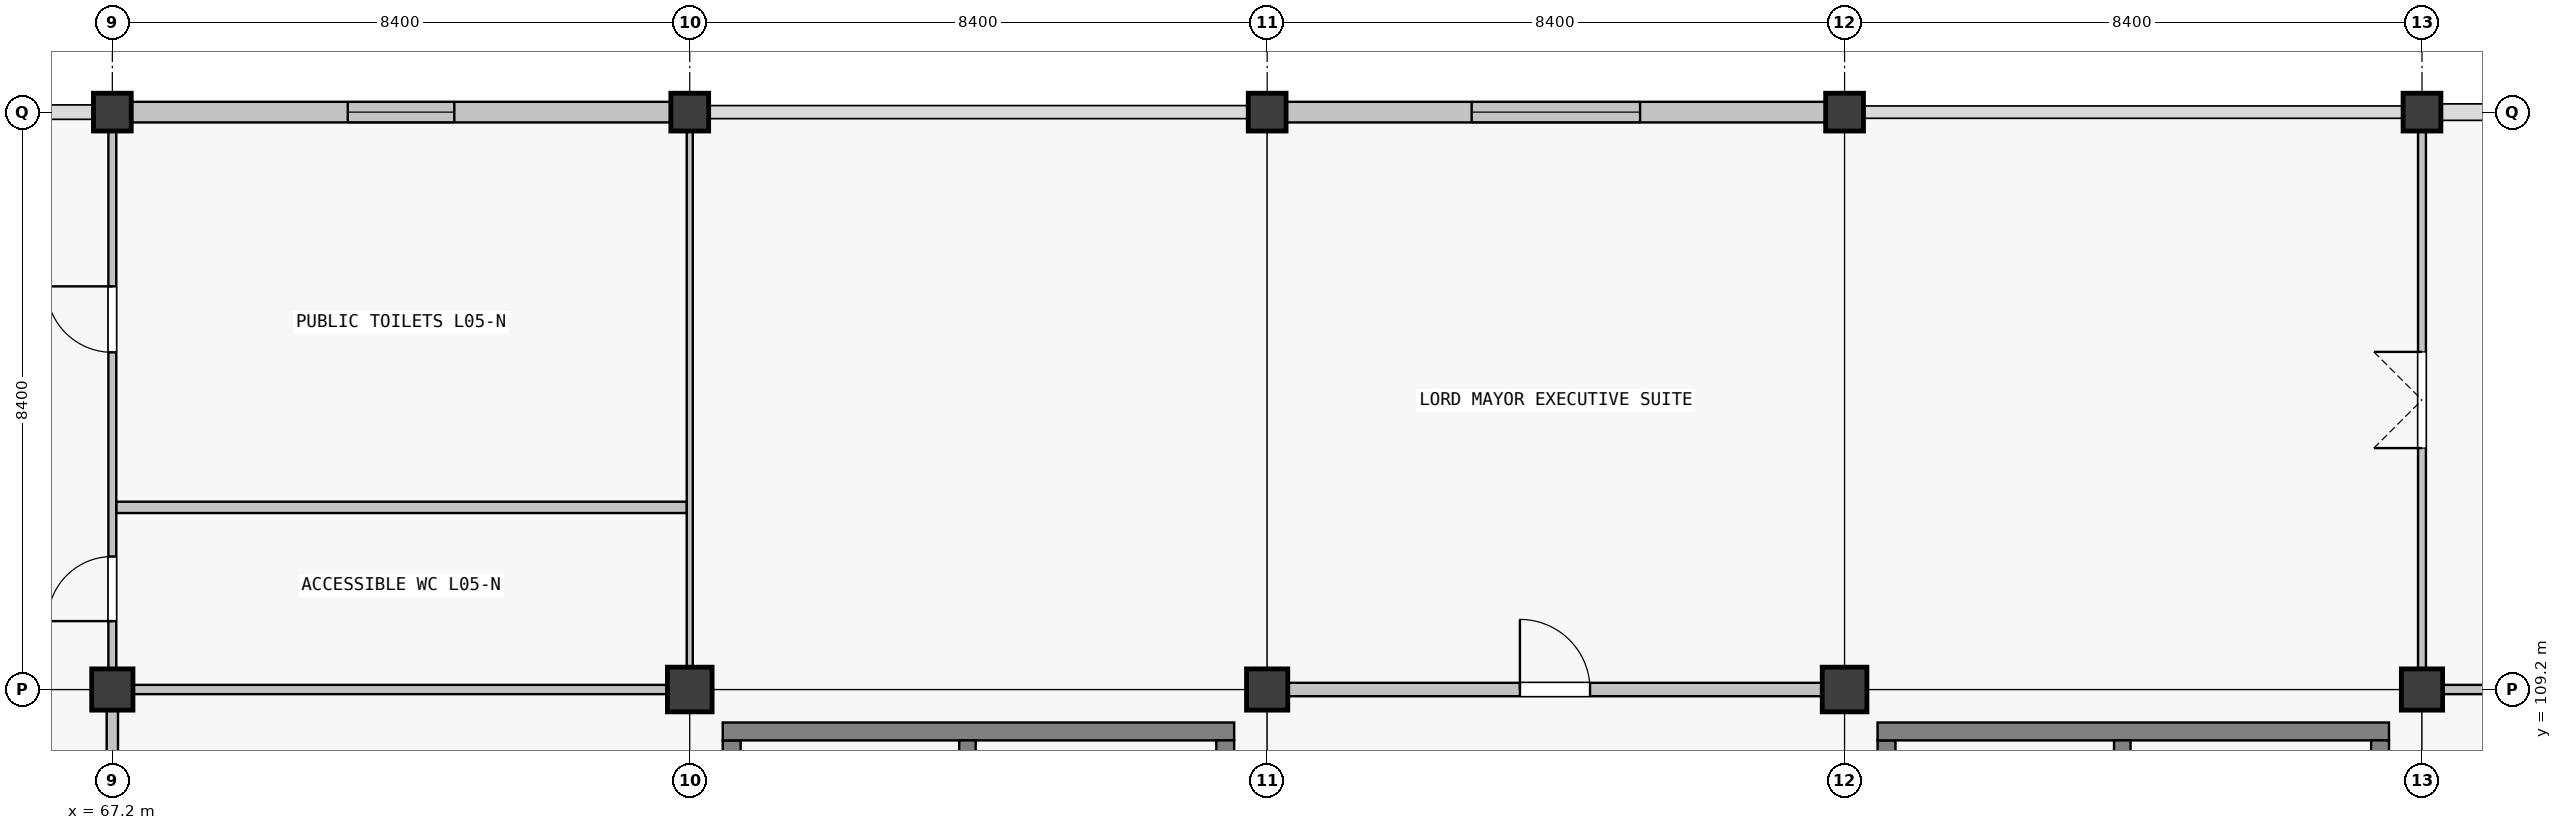
"""IFC4 building model, lengths in metres.
Left out: names, types, materials, properties, quantities, classifications, styles, units other than length and angle.
Written with IfcOpenShell. Run it as: python <this file> out.ifc"""

import sys

from ifc_helpers import new_model, si_unit, direction, frame, frame_2d, origin, origin_2d, place, context, subcontext, project, spatial, rectangle, extrude, element, fill, save


model = new_model("IFC4")
c1 = context("Model", 3, precision=1e-05, world=origin(), true_north=direction((0.0, 1.0)))
c2 = subcontext(c1, "Body", "Model", "MODEL_VIEW")
j1 = project(units=[si_unit("LENGTHUNIT", "METRE"), si_unit("PLANEANGLEUNIT", "RADIAN")], contexts=[c1])
p1 = place(None, origin())
s1 = spatial("IfcSite", under=j1, at=p1, CompositionType="ELEMENT")
p2 = place(p1, origin())
s2 = spatial("IfcBuilding", under=s1, at=p2, CompositionType="ELEMENT")
p3 = place(p2, frame((0.0, 0.0, 23.4)))
s3 = spatial("IfcBuildingStorey", under=s2, at=p3, CompositionType="ELEMENT", Elevation=23.4)
p4 = place(p3, frame((67.2, 109.2, 0.0), z_axis=(0.0, 0.0, 1.0), x_axis=(1.0, 0.0, 0.0)))
e1 = element("IfcColumn", 1, at=p4, inside=s3, PredefinedType="COLUMN", context=c2, shape_type="SweptSolid", body=[
    extrude(rectangle(XDim=0.6, YDim=0.6, at=origin_2d()), origin(), (0.0, 0.0, 1.0), 4.32),
])
p5 = place(p3, frame((67.2, 117.6, 0.0), z_axis=(0.0, 0.0, 1.0), x_axis=(1.0, 0.0, 0.0)))
e2 = element("IfcColumn", 2, at=p5, inside=s3, PredefinedType="COLUMN", context=c2, shape_type="SweptSolid", body=[
    extrude(rectangle(XDim=0.55, YDim=0.55, at=origin_2d()), origin(), (0.0, 0.0, 1.0), 4.07),
])
p6 = place(p3, frame((75.6, 109.2, 0.0), z_axis=(0.0, 0.0, 1.0), x_axis=(1.0, 0.0, 0.0)))
e3 = element("IfcColumn", 3, at=p6, inside=s3, PredefinedType="COLUMN", context=c2, shape_type="SweptSolid", body=[
    extrude(rectangle(XDim=0.65, YDim=0.65, at=origin_2d()), origin(), (0.0, 0.0, 1.0), 4.32),
])
p7 = place(p3, frame((75.6, 117.6, 0.0), z_axis=(0.0, 0.0, 1.0), x_axis=(1.0, 0.0, 0.0)))
e4 = element("IfcColumn", 4, at=p7, inside=s3, PredefinedType="COLUMN", context=c2, shape_type="SweptSolid", body=[
    extrude(rectangle(XDim=0.55, YDim=0.55, at=origin_2d()), origin(), (0.0, 0.0, 1.0), 4.07),
])
p8 = place(p3, frame((84.0, 109.2, 0.0), z_axis=(0.0, 0.0, 1.0), x_axis=(1.0, 0.0, 0.0)))
e5 = element("IfcColumn", 5, at=p8, inside=s3, PredefinedType="COLUMN", context=c2, shape_type="SweptSolid", body=[
    extrude(rectangle(XDim=0.6, YDim=0.6, at=origin_2d()), origin(), (0.0, 0.0, 1.0), 4.32),
])
p9 = place(p3, frame((84.0, 117.6, 0.0), z_axis=(0.0, 0.0, 1.0), x_axis=(1.0, 0.0, 0.0)))
e6 = element("IfcColumn", 6, at=p9, inside=s3, PredefinedType="COLUMN", context=c2, shape_type="SweptSolid", body=[
    extrude(rectangle(XDim=0.55, YDim=0.55, at=origin_2d()), origin(), (0.0, 0.0, 1.0), 4.07),
])
p10 = place(p3, frame((92.4, 109.2, 0.0), z_axis=(0.0, 0.0, 1.0), x_axis=(1.0, 0.0, 0.0)))
e7 = element("IfcColumn", 7, at=p10, inside=s3, PredefinedType="COLUMN", context=c2, shape_type="SweptSolid", body=[
    extrude(rectangle(XDim=0.65, YDim=0.65, at=origin_2d()), origin(), (0.0, 0.0, 1.0), 4.32),
])
p11 = place(p3, frame((92.4, 117.6, 0.0), z_axis=(0.0, 0.0, 1.0), x_axis=(1.0, 0.0, 0.0)))
e8 = element("IfcColumn", 8, at=p11, inside=s3, PredefinedType="COLUMN", context=c2, shape_type="SweptSolid", body=[
    extrude(rectangle(XDim=0.55, YDim=0.55, at=origin_2d()), origin(), (0.0, 0.0, 1.0), 4.07),
])
p12 = place(p3, frame((100.8, 109.2, 0.0), z_axis=(0.0, 0.0, 1.0), x_axis=(1.0, 0.0, 0.0)))
e9 = element("IfcColumn", 9, at=p12, inside=s3, PredefinedType="COLUMN", context=c2, shape_type="SweptSolid", body=[
    extrude(rectangle(XDim=0.6, YDim=0.6, at=origin_2d()), origin(), (0.0, 0.0, 1.0), 4.32),
])
p13 = place(p3, frame((100.8, 117.6, 0.0), z_axis=(0.0, 0.0, 1.0), x_axis=(1.0, 0.0, 0.0)))
e10 = element("IfcColumn", 10, at=p13, inside=s3, PredefinedType="COLUMN", context=c2, shape_type="SweptSolid", body=[
    extrude(rectangle(XDim=0.55, YDim=0.55, at=origin_2d()), origin(), (0.0, 0.0, 1.0), 4.07),
])
p14 = place(p3, frame((67.476, 117.6, 0.0), z_axis=(0.0, 0.0, 1.0), x_axis=(1.0, 0.0, 0.0)))
e11 = element("IfcWall", 11, at=p14, inside=s3, PredefinedType="SOLIDWALL", context=c2, shape_type="SweptSolid", body=[
    extrude(rectangle(XDim=7.848, YDim=0.3, at=frame_2d((3.924, 0.0))), origin(), (0.0, 0.0, 1.0), 3.37),
])
p15 = place(p14, frame((3.149, 0.0, 0.9)))
e12 = element("IfcOpeningElement", 12, at=p15, cuts=e11, PredefinedType="OPENING", context=c2, shape_type="SweptSolid", body=[
    extrude(rectangle(XDim=1.55, YDim=1.6, at=frame_2d((0.775, 0.8))), frame((0.0, 0.15, 0.0), z_axis=(0.0, -1.0, 0.0), x_axis=(1.0, 0.0, 0.0)), (0.0, 0.0, 1.0), 0.3),
])
p16 = place(p3, frame((84.276, 117.6, 0.0), z_axis=(0.0, 0.0, 1.0), x_axis=(1.0, 0.0, 0.0)))
e13 = element("IfcWall", 13, at=p16, inside=s3, PredefinedType="SOLIDWALL", context=c2, shape_type="SweptSolid", body=[
    extrude(rectangle(XDim=7.848, YDim=0.3, at=frame_2d((3.924, 0.0))), origin(), (0.0, 0.0, 1.0), 3.37),
])
p17 = place(p16, frame((2.699, 0.0, 0.9)))
e14 = element("IfcOpeningElement", 14, at=p17, cuts=e13, PredefinedType="OPENING", context=c2, shape_type="SweptSolid", body=[
    extrude(rectangle(XDim=2.45, YDim=1.45, at=frame_2d((1.225, 0.725))), frame((0.0, 0.15, 0.0), z_axis=(0.0, -1.0, 0.0), x_axis=(1.0, 0.0, 0.0)), (0.0, 0.0, 1.0), 0.3),
])
p18 = place(p3, frame((76.21, 101.54, 0.0), z_axis=(0.0, 0.0, 1.0), x_axis=(0.0, 1.0, 0.0)))
e15 = element("IfcWall", 15, at=p18, inside=s3, PredefinedType="SHEAR", context=c2, shape_type="SweptSolid", body=[
    extrude(rectangle(XDim=6.92, YDim=0.26, at=frame_2d((3.46, 0.0))), origin(), (0.0, 0.0, 1.0), 4.32),
])
p19 = place(p3, frame((76.08, 108.59, 0.0), z_axis=(0.0, 0.0, 1.0), x_axis=(1.0, 0.0, 0.0)))
e16 = element("IfcWall", 16, at=p19, inside=s3, PredefinedType="SHEAR", context=c2, shape_type="SweptSolid", body=[
    extrude(rectangle(XDim=7.44, YDim=0.26, at=frame_2d((3.72, 0.0))), origin(), (0.0, 0.0, 1.0), 4.32),
])
p20 = place(p3, frame((83.39, 108.46, 0.0), z_axis=(0.0, 0.0, 1.0), x_axis=(0.0, -1.0, 0.0)))
e17 = element("IfcWall", 17, at=p20, inside=s3, PredefinedType="SHEAR", context=c2, shape_type="SweptSolid", body=[
    extrude(rectangle(XDim=6.92, YDim=0.26, at=frame_2d((3.46, 0.0))), origin(), (0.0, 0.0, 1.0), 4.32),
])
p21 = place(p20, frame((4.01, 0.0, 0.0)))
e18 = element("IfcOpeningElement", 18, at=p21, cuts=e17, PredefinedType="OPENING", context=c2, shape_type="SweptSolid", body=[
    extrude(rectangle(XDim=1.5, YDim=2.15, at=frame_2d((0.75, 1.075))), frame((0.0, 0.13, 0.0), z_axis=(0.0, -1.0, 0.0), x_axis=(1.0, 0.0, 0.0)), (0.0, 0.0, 1.0), 0.26),
])
p22 = place(p3, frame((79.64, 101.54, 0.0), z_axis=(0.0, 0.0, 1.0), x_axis=(0.0, 1.0, 0.0)))
e19 = element("IfcWall", 19, at=p22, inside=s3, PredefinedType="SHEAR", context=c2, shape_type="SweptSolid", body=[
    extrude(rectangle(XDim=6.92, YDim=0.24, at=frame_2d((3.46, 0.0))), origin(), (0.0, 0.0, 1.0), 4.32),
])
p23 = place(p22, frame((0.12, 0.0, 0.0)))
e20 = element("IfcOpeningElement", 20, at=p23, cuts=e19, PredefinedType="OPENING", context=c2, shape_type="SweptSolid", body=[
    extrude(rectangle(XDim=1.0, YDim=2.15, at=frame_2d((0.5, 1.075))), frame((0.0, 0.12, 0.0), z_axis=(0.0, -1.0, 0.0), x_axis=(1.0, 0.0, 0.0)), (0.0, 0.0, 1.0), 0.24),
])
p24 = place(p3, frame((93.01, 101.54, 0.0), z_axis=(0.0, 0.0, 1.0), x_axis=(0.0, 1.0, 0.0)))
e21 = element("IfcWall", 21, at=p24, inside=s3, PredefinedType="SHEAR", context=c2, shape_type="SweptSolid", body=[
    extrude(rectangle(XDim=6.92, YDim=0.26, at=frame_2d((3.46, 0.0))), origin(), (0.0, 0.0, 1.0), 4.32),
])
p25 = place(p3, frame((92.88, 108.59, 0.0), z_axis=(0.0, 0.0, 1.0), x_axis=(1.0, 0.0, 0.0)))
e22 = element("IfcWall", 22, at=p25, inside=s3, PredefinedType="SHEAR", context=c2, shape_type="SweptSolid", body=[
    extrude(rectangle(XDim=7.44, YDim=0.26, at=frame_2d((3.72, 0.0))), origin(), (0.0, 0.0, 1.0), 4.32),
])
p26 = place(p3, frame((100.19, 108.46, 0.0), z_axis=(0.0, 0.0, 1.0), x_axis=(0.0, -1.0, 0.0)))
e23 = element("IfcWall", 23, at=p26, inside=s3, PredefinedType="SHEAR", context=c2, shape_type="SweptSolid", body=[
    extrude(rectangle(XDim=6.92, YDim=0.26, at=frame_2d((3.46, 0.0))), origin(), (0.0, 0.0, 1.0), 4.32),
])
p27 = place(p26, frame((4.01, 0.0, 0.0)))
e24 = element("IfcOpeningElement", 24, at=p27, cuts=e23, PredefinedType="OPENING", context=c2, shape_type="SweptSolid", body=[
    extrude(rectangle(XDim=1.5, YDim=2.15, at=frame_2d((0.75, 1.075))), frame((0.0, 0.13, 0.0), z_axis=(0.0, -1.0, 0.0), x_axis=(1.0, 0.0, 0.0)), (0.0, 0.0, 1.0), 0.26),
])
p28 = place(p3, frame((96.44, 101.54, 0.0), z_axis=(0.0, 0.0, 1.0), x_axis=(0.0, 1.0, 0.0)))
e25 = element("IfcWall", 25, at=p28, inside=s3, PredefinedType="SHEAR", context=c2, shape_type="SweptSolid", body=[
    extrude(rectangle(XDim=6.92, YDim=0.24, at=frame_2d((3.46, 0.0))), origin(), (0.0, 0.0, 1.0), 4.32),
])
p29 = place(p28, frame((0.12, 0.0, 0.0)))
e26 = element("IfcOpeningElement", 26, at=p29, cuts=e25, PredefinedType="OPENING", context=c2, shape_type="SweptSolid", body=[
    extrude(rectangle(XDim=1.0, YDim=2.15, at=frame_2d((0.5, 1.075))), frame((0.0, 0.12, 0.0), z_axis=(0.0, -1.0, 0.0), x_axis=(1.0, 0.0, 0.0)), (0.0, 0.0, 1.0), 0.24),
])
p30 = place(p3, frame((67.502, 109.2, 0.0), z_axis=(0.0, 0.0, 1.0), x_axis=(1.0, 0.0, 0.0)))
e27 = element("IfcWall", 27, at=p30, inside=s3, PredefinedType="PARTITIONING", context=c2, shape_type="SweptSolid", body=[
    extrude(rectangle(XDim=7.771, YDim=0.135, at=frame_2d((3.885, 0.0))), origin(), (0.0, 0.0, 1.0), 3.19),
])
p31 = place(p3, frame((84.302, 109.2, 0.0), z_axis=(0.0, 0.0, 1.0), x_axis=(1.0, 0.0, 0.0)))
e28 = element("IfcWall", 28, at=p31, inside=s3, PredefinedType="PARTITIONING", context=c2, shape_type="SweptSolid", body=[
    extrude(rectangle(XDim=7.771, YDim=0.195, at=frame_2d((3.885, 0.0))), origin(), (0.0, 0.0, 1.0), 3.19),
])
p32 = place(p31, frame((3.375, 0.0, 0.0)))
e29 = element("IfcOpeningElement", 29, at=p32, cuts=e28, PredefinedType="OPENING", context=c2, shape_type="SweptSolid", body=[
    extrude(rectangle(XDim=1.02, YDim=2.2, at=frame_2d((0.51, 1.1))), frame((0.0, 0.098, 0.0), z_axis=(0.0, -1.0, 0.0), x_axis=(1.0, 0.0, 0.0)), (0.0, 0.0, 1.0), 0.195),
])
p33 = place(p3, frame((101.102, 109.2, 0.0), z_axis=(0.0, 0.0, 1.0), x_axis=(1.0, 0.0, 0.0)))
e30 = element("IfcWall", 30, at=p33, inside=s3, PredefinedType="PARTITIONING", context=c2, shape_type="SweptSolid", body=[
    extrude(rectangle(XDim=7.771, YDim=0.135, at=frame_2d((3.885, 0.0))), origin(), (0.0, 0.0, 1.0), 3.19),
])
p34 = place(p33, frame((3.035, 0.0, 0.0)))
e31 = element("IfcOpeningElement", 31, at=p34, cuts=e30, PredefinedType="OPENING", context=c2, shape_type="SweptSolid", body=[
    extrude(rectangle(XDim=1.7, YDim=2.35, at=frame_2d((0.85, 1.175))), frame((0.0, 0.067, 0.0), z_axis=(0.0, -1.0, 0.0), x_axis=(1.0, 0.0, 0.0)), (0.0, 0.0, 1.0), 0.135),
])
p35 = place(p3, frame((67.2, 101.127, 0.0), z_axis=(0.0, 0.0, 1.0), x_axis=(0.0, 1.0, 0.0)))
e32 = element("IfcWall", 32, at=p35, inside=s3, PredefinedType="PARTITIONING", context=c2, shape_type="SweptSolid", body=[
    extrude(rectangle(XDim=7.771, YDim=0.165, at=frame_2d((3.885, 0.0))), origin(), (0.0, 0.0, 1.0), 3.19),
])
p36 = place(p35, frame((3.415, 0.0, 0.0)))
e33 = element("IfcOpeningElement", 33, at=p36, cuts=e32, PredefinedType="OPENING", context=c2, shape_type="SweptSolid", body=[
    extrude(rectangle(XDim=0.94, YDim=2.15, at=frame_2d((0.47, 1.075))), frame((0.0, 0.083, 0.0), z_axis=(0.0, -1.0, 0.0), x_axis=(1.0, 0.0, 0.0)), (0.0, 0.0, 1.0), 0.165),
])
p37 = place(p3, frame((67.2, 109.502, 0.0), z_axis=(0.0, 0.0, 1.0), x_axis=(0.0, 1.0, 0.0)))
e34 = element("IfcWall", 34, at=p37, inside=s3, PredefinedType="PARTITIONING", context=c2, shape_type="SweptSolid", body=[
    extrude(rectangle(XDim=7.821, YDim=0.115, at=frame_2d((3.911, 0.0))), origin(), (0.0, 0.0, 1.0), 3.19),
])
p38 = place(p37, frame((0.693, 0.0, 0.0)))
e35 = element("IfcOpeningElement", 35, at=p38, cuts=e34, PredefinedType="OPENING", context=c2, shape_type="SweptSolid", body=[
    extrude(rectangle(XDim=0.94, YDim=2.08, at=frame_2d((0.47, 1.04))), frame((0.0, 0.058, 0.0), z_axis=(0.0, -1.0, 0.0), x_axis=(1.0, 0.0, 0.0)), (0.0, 0.0, 1.0), 0.115),
])
p39 = place(p37, frame((4.603, 0.0, 0.0)))
e36 = element("IfcOpeningElement", 36, at=p39, cuts=e34, PredefinedType="OPENING", context=c2, shape_type="SweptSolid", body=[
    extrude(rectangle(XDim=0.96, YDim=2.1, at=frame_2d((0.48, 1.05))), frame((0.0, 0.058, 0.0), z_axis=(0.0, -1.0, 0.0), x_axis=(1.0, 0.0, 0.0)), (0.0, 0.0, 1.0), 0.115),
])
p40 = place(p3, frame((75.6, 109.527, 0.0), z_axis=(0.0, 0.0, 1.0), x_axis=(0.0, 1.0, 0.0)))
e37 = element("IfcWall", 37, at=p40, inside=s3, PredefinedType="PARTITIONING", context=c2, shape_type="SweptSolid", body=[
    extrude(rectangle(XDim=7.796, YDim=0.088, at=frame_2d((3.898, 0.0))), origin(), (0.0, 0.0, 1.0), 3.19),
])
p41 = place(p3, frame((100.8, 109.502, 0.0), z_axis=(0.0, 0.0, 1.0), x_axis=(0.0, 1.0, 0.0)))
e38 = element("IfcWall", 38, at=p41, inside=s3, PredefinedType="PARTITIONING", context=c2, shape_type="SweptSolid", body=[
    extrude(rectangle(XDim=7.821, YDim=0.115, at=frame_2d((3.911, 0.0))), origin(), (0.0, 0.0, 1.0), 3.19),
])
p42 = place(p41, frame((3.21, 0.0, 0.0)))
e39 = element("IfcOpeningElement", 39, at=p42, cuts=e38, PredefinedType="OPENING", context=c2, shape_type="SweptSolid", body=[
    extrude(rectangle(XDim=1.4, YDim=2.25, at=frame_2d((0.7, 1.125))), frame((0.0, 0.058, 0.0), z_axis=(0.0, -1.0, 0.0), x_axis=(1.0, 0.0, 0.0)), (0.0, 0.0, 1.0), 0.115),
])
p43 = place(p3, frame((67.26, 111.85, 0.0), z_axis=(0.0, 0.0, 1.0), x_axis=(1.0, 0.0, 0.0)))
e40 = element("IfcWall", 40, at=p43, inside=s3, PredefinedType="PARTITIONING", context=c2, shape_type="SweptSolid", body=[
    extrude(rectangle(XDim=8.294, YDim=0.165, at=frame_2d((4.147, 0.0))), origin(), (0.0, 0.0, 1.0), 3.19),
])
p44 = place(p15, origin())
e41 = element("IfcWindow", 41, at=p44, inside=s3, PartitioningType="SINGLE_PANEL", PredefinedType="WINDOW", context=c2, shape_type="SweptSolid", body=[
    extrude(rectangle(XDim=1.55, YDim=1.6, at=frame_2d((0.775, 0.8))), frame((0.0, 0.03, 0.0), z_axis=(0.0, -1.0, 0.0), x_axis=(1.0, 0.0, 0.0)), (0.0, 0.0, 1.0), 0.06),
])
fill(e12, e41)
p45 = place(p17, origin())
e42 = element("IfcWindow", 42, at=p45, inside=s3, PartitioningType="SINGLE_PANEL", PredefinedType="WINDOW", context=c2, shape_type="SweptSolid", body=[
    extrude(rectangle(XDim=2.45, YDim=1.45, at=frame_2d((1.225, 0.725))), frame((0.0, 0.03, 0.0), z_axis=(0.0, -1.0, 0.0), x_axis=(1.0, 0.0, 0.0)), (0.0, 0.0, 1.0), 0.06),
])
fill(e14, e42)
p46 = place(p38, origin())
e43 = element("IfcDoor", 43, at=p46, inside=s3, OperationType="SINGLE_SWING_LEFT", PredefinedType="DOOR", context=c2, shape_type="SweptSolid", body=[
    extrude(rectangle(XDim=0.94, YDim=2.08, at=frame_2d((0.47, 1.04))), frame((0.0, 0.025, 0.0), z_axis=(0.0, -1.0, 0.0), x_axis=(1.0, 0.0, 0.0)), (0.0, 0.0, 1.0), 0.05),
])
fill(e35, e43)
p47 = place(p39, origin())
e44 = element("IfcDoor", 44, at=p47, inside=s3, OperationType="SINGLE_SWING_RIGHT", PredefinedType="DOOR", context=c2, shape_type="SweptSolid", body=[
    extrude(rectangle(XDim=0.96, YDim=2.1, at=frame_2d((0.48, 1.05))), frame((0.0, 0.025, 0.0), z_axis=(0.0, -1.0, 0.0), x_axis=(1.0, 0.0, 0.0)), (0.0, 0.0, 1.0), 0.05),
])
fill(e36, e44)
p48 = place(p32, origin())
e45 = element("IfcDoor", 45, at=p48, inside=s3, OperationType="SINGLE_SWING_LEFT", PredefinedType="DOOR", context=c2, shape_type="SweptSolid", body=[
    extrude(rectangle(XDim=1.02, YDim=2.2, at=frame_2d((0.51, 1.1))), frame((0.0, 0.025, 0.0), z_axis=(0.0, -1.0, 0.0), x_axis=(1.0, 0.0, 0.0)), (0.0, 0.0, 1.0), 0.05),
])
fill(e29, e45)
p49 = place(p42, origin())
e46 = element("IfcDoor", 46, at=p49, inside=s3, OperationType="DOUBLE_DOOR_SINGLE_SWING", PredefinedType="DOOR", context=c2, shape_type="SweptSolid", body=[
    extrude(rectangle(XDim=1.4, YDim=2.25, at=frame_2d((0.7, 1.125))), frame((0.0, 0.025, 0.0), z_axis=(0.0, -1.0, 0.0), x_axis=(1.0, 0.0, 0.0)), (0.0, 0.0, 1.0), 0.05),
])
fill(e39, e46)
save(model, sys.argv[1])
